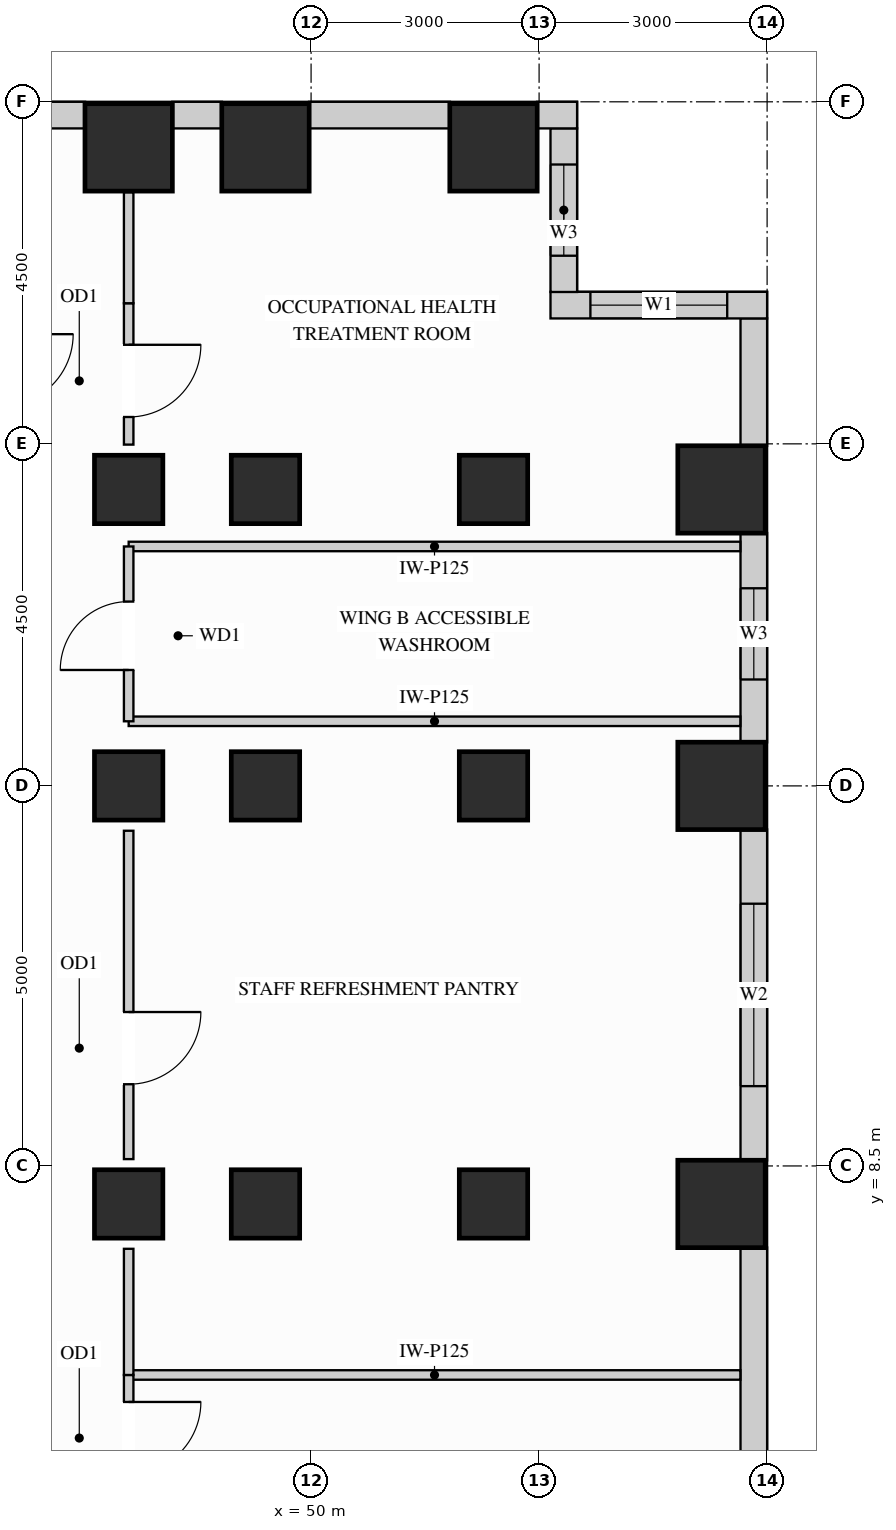
"""IFC4 building model, lengths in metres.
Left out: names, types, materials, properties, quantities, classifications, styles, units other than length and angle.
Written with IfcOpenShell. Run it as: python <this file> out.ifc"""

import sys

from ifc_helpers import new_model, si_unit, direction, frame, frame_2d, origin, origin_2d, place, context, subcontext, project, spatial, rectangle, extrude, source, transform, mapped, element, fill, save


model = new_model("IFC4")
c1 = context("Model", 3, precision=1e-05, world=origin(), true_north=direction((0.0, 1.0)))
c2 = subcontext(c1, "Body", "Model", "MODEL_VIEW")
j1 = project(units=[si_unit("LENGTHUNIT", "METRE"), si_unit("PLANEANGLEUNIT", "RADIAN")], contexts=[c1])
p1 = place(None, origin())
s1 = spatial("IfcSite", under=j1, at=p1, CompositionType="ELEMENT")
p2 = place(p1, origin())
s2 = spatial("IfcBuilding", under=s1, at=p2, CompositionType="ELEMENT")
p3 = place(p2, frame((0.0, 0.0, 117.0)))
s3 = spatial("IfcBuildingStorey", under=s2, at=p3, CompositionType="ELEMENT", Elevation=117.0)
m1 = source(origin(), c2, "Body", "SweptSolid", [
    extrude(rectangle(XDim=0.9, YDim=0.9, at=origin_2d()), origin(), (0.0, 0.0, 1.0), 3.38),
])
for number, where, z_axis, x_axis in (
    (1, (47.6, 13.5, 0.0), (0.0, 0.0, 1.0), (1.0, 0.0, 0.0)),
    (2, (47.6, 8.0, 0.0), (0.0, 0.0, 1.0), (1.0, 0.0, 0.0)),
    (3, (47.6, 17.4, 0.0), (0.0, 0.0, 1.0), (1.0, 0.0, 0.0)),
    (4, (49.4, 13.5, 0.0), (0.0, 0.0, 1.0), (1.0, 0.0, 0.0)),
    (5, (49.4, 17.4, 0.0), (0.0, 0.0, 1.0), (1.0, 0.0, 0.0)),
    (6, (49.4, 8.0, 0.0), (0.0, 0.0, 1.0), (1.0, 0.0, 0.0)),
    (7, (52.4, 13.5, 0.0), (0.0, 0.0, 1.0), (1.0, 0.0, 0.0)),
    (8, (52.4, 17.4, 0.0), (0.0, 0.0, 1.0), (1.0, 0.0, 0.0)),
    (9, (52.4, 8.0, 0.0), (0.0, 0.0, 1.0), (1.0, 0.0, 0.0)),
):
    element("IfcColumn", number, at=place(p3, frame(where, z_axis=z_axis, x_axis=x_axis)), inside=s3, PredefinedType="COLUMN", context=c2, shape_type="MappedRepresentation", body=[
        mapped(m1, transform((0.0, 0.0, 0.0), x_axis=(1.0, 0.0, 0.0), y_axis=(0.0, 1.0, 0.0), z_axis=(0.0, 0.0, 1.0))),
    ])
m2 = source(origin(), c2, "Body", "SweptSolid", [
    extrude(rectangle(XDim=1.15, YDim=1.15, at=origin_2d()), origin(), (0.0, 0.0, 1.0), 3.38),
])
for number, where, z_axis, x_axis in (
    (10, (47.6, 21.9, 0.0), (0.0, 0.0, 1.0), (1.0, 0.0, 0.0)),
    (11, (49.4, 21.9, 0.0), (0.0, 0.0, 1.0), (1.0, 0.0, 0.0)),
    (12, (52.4, 21.9, 0.0), (0.0, 0.0, 1.0), (1.0, 0.0, 0.0)),
    (13, (55.4, 13.5, 0.0), (0.0, 0.0, 1.0), (1.0, 0.0, 0.0)),
    (14, (55.4, 17.4, 0.0), (0.0, 0.0, 1.0), (1.0, 0.0, 0.0)),
    (15, (55.4, 8.0, 0.0), (0.0, 0.0, 1.0), (1.0, 0.0, 0.0)),
):
    element("IfcColumn", number, at=place(p3, frame(where, z_axis=z_axis, x_axis=x_axis)), inside=s3, PredefinedType="COLUMN", context=c2, shape_type="MappedRepresentation", body=[
        mapped(m2, transform((0.0, 0.0, 0.0), x_axis=(1.0, 0.0, 0.0), y_axis=(0.0, 1.0, 0.0), z_axis=(0.0, 0.0, 1.0))),
    ])
m3 = source(origin(), c2, "Body", "SweptSolid", [
    extrude(rectangle(XDim=3.354, YDim=0.35, at=frame_2d((1.677, 0.0))), origin(), (0.0, 0.0, 1.0), 3.365),
])
p4 = place(p3, frame((55.825, 4.073, 0.0), z_axis=(0.0, 0.0, 1.0), x_axis=(0.0, 1.0, 0.0)))
e16 = element("IfcWall", 16, at=p4, inside=s3, PredefinedType="SOLIDWALL", context=c2, shape_type="MappedRepresentation", body=[
    mapped(m3, transform((0.0, 0.0, 0.0), x_axis=(1.0, 0.0, 0.0), y_axis=(0.0, 1.0, 0.0), z_axis=(0.0, 0.0, 1.0))),
])
p5 = place(p3, frame((55.825, 8.573, 0.0), z_axis=(0.0, 0.0, 1.0), x_axis=(0.0, 1.0, 0.0)))
e17 = element("IfcWall", 17, at=p5, inside=s3, PredefinedType="SOLIDWALL", context=c2, shape_type="SweptSolid", body=[
    extrude(rectangle(XDim=4.354, YDim=0.35, at=frame_2d((2.177, 0.0))), origin(), (0.0, 0.0, 1.0), 3.365),
])
p6 = place(p5, frame((0.977, 0.0, 0.78)))
e18 = element("IfcOpeningElement", 18, at=p6, cuts=e17, PredefinedType="OPENING", context=c2, shape_type="SweptSolid", body=[
    extrude(rectangle(XDim=2.4, YDim=2.1, at=frame_2d((1.2, 1.05))), frame((0.0, 0.185, 0.0), z_axis=(0.0, -1.0, 0.0), x_axis=(1.0, 0.0, 0.0)), (0.0, 0.0, 1.0), 0.37),
])
p7 = place(p3, frame((55.825, 14.073, 0.0), z_axis=(0.0, 0.0, 1.0), x_axis=(0.0, 1.0, 0.0)))
e19 = element("IfcWall", 19, at=p7, inside=s3, PredefinedType="SOLIDWALL", context=c2, shape_type="SweptSolid", body=[
    extrude(rectangle(XDim=2.754, YDim=0.35, at=frame_2d((1.377, 0.0))), origin(), (0.0, 0.0, 1.0), 3.365),
])
p8 = place(p7, frame((0.827, 0.0, 0.78)))
e20 = element("IfcOpeningElement", 20, at=p8, cuts=e19, PredefinedType="OPENING", context=c2, shape_type="SweptSolid", body=[
    extrude(rectangle(XDim=1.2, YDim=2.1, at=frame_2d((0.6, 1.05))), frame((0.0, 0.185, 0.0), z_axis=(0.0, -1.0, 0.0), x_axis=(1.0, 0.0, 0.0)), (0.0, 0.0, 1.0), 0.37),
])
m4 = source(origin(), c2, "Body", "SweptSolid", [
    extrude(rectangle(XDim=1.679, YDim=0.35, at=frame_2d((0.84, 0.0))), origin(), (0.0, 0.0, 1.0), 3.365),
])
p9 = place(p3, frame((55.825, 17.973, 0.0), z_axis=(0.0, 0.0, 1.0), x_axis=(0.0, 1.0, 0.0)))
e21 = element("IfcWall", 21, at=p9, inside=s3, PredefinedType="SOLIDWALL", context=c2, shape_type="MappedRepresentation", body=[
    mapped(m4, transform((0.0, 0.0, 0.0), x_axis=(1.0, 0.0, 0.0), y_axis=(0.0, 1.0, 0.0), z_axis=(0.0, 0.0, 1.0))),
])
p10 = place(p3, frame((56.0, 19.825, 0.0), z_axis=(0.0, 0.0, 1.0), x_axis=(-1.0, 0.0, 0.0)))
e22 = element("IfcWall", 22, at=p10, inside=s3, PredefinedType="SOLIDWALL", context=c2, shape_type="SweptSolid", body=[
    extrude(rectangle(XDim=2.85, YDim=0.35, at=frame_2d((1.425, 0.0))), origin(), (0.0, 0.0, 1.0), 3.365),
])
p11 = place(p10, frame((0.525, 0.0, 0.78)))
e23 = element("IfcOpeningElement", 23, at=p11, cuts=e22, PredefinedType="OPENING", context=c2, shape_type="SweptSolid", body=[
    extrude(rectangle(XDim=1.8, YDim=2.1, at=frame_2d((0.9, 1.05))), frame((0.0, 0.185, 0.0), z_axis=(0.0, -1.0, 0.0), x_axis=(1.0, 0.0, 0.0)), (0.0, 0.0, 1.0), 0.37),
])
p12 = place(p3, frame((53.325, 19.998, 0.0), z_axis=(0.0, 0.0, 1.0), x_axis=(0.0, 1.0, 0.0)))
e24 = element("IfcWall", 24, at=p12, inside=s3, PredefinedType="SOLIDWALL", context=c2, shape_type="SweptSolid", body=[
    extrude(rectangle(XDim=2.154, YDim=0.35, at=frame_2d((1.077, 0.0))), origin(), (0.0, 0.0, 1.0), 3.365),
])
p13 = place(p12, frame((0.477, 0.0, 0.78)))
e25 = element("IfcOpeningElement", 25, at=p13, cuts=e24, PredefinedType="OPENING", context=c2, shape_type="SweptSolid", body=[
    extrude(rectangle(XDim=1.2, YDim=2.1, at=frame_2d((0.6, 1.05))), frame((0.0, 0.185, 0.0), z_axis=(0.0, -1.0, 0.0), x_axis=(1.0, 0.0, 0.0)), (0.0, 0.0, 1.0), 0.37),
])
m5 = source(origin(), c2, "Body", "SweptSolid", [
    extrude(rectangle(XDim=0.527, YDim=0.35, at=frame_2d((0.264, 0.0))), origin(), (0.0, 0.0, 1.0), 3.365),
])
p14 = place(p3, frame((53.5, 22.325, 0.0), z_axis=(0.0, 0.0, 1.0), x_axis=(-1.0, 0.0, 0.0)))
e26 = element("IfcWall", 26, at=p14, inside=s3, PredefinedType="SOLIDWALL", context=c2, shape_type="MappedRepresentation", body=[
    mapped(m5, transform((0.0, 0.0, 0.0), x_axis=(1.0, 0.0, 0.0), y_axis=(0.0, 1.0, 0.0), z_axis=(0.0, 0.0, 1.0))),
])
m6 = source(origin(), c2, "Body", "SweptSolid", [
    extrude(rectangle(XDim=1.854, YDim=0.35, at=frame_2d((0.927, 0.0))), origin(), (0.0, 0.0, 1.0), 3.365),
])
p15 = place(p3, frame((51.827, 22.325, 0.0), z_axis=(0.0, 0.0, 1.0), x_axis=(-1.0, 0.0, 0.0)))
e27 = element("IfcWall", 27, at=p15, inside=s3, PredefinedType="SOLIDWALL", context=c2, shape_type="MappedRepresentation", body=[
    mapped(m6, transform((0.0, 0.0, 0.0), x_axis=(1.0, 0.0, 0.0), y_axis=(0.0, 1.0, 0.0), z_axis=(0.0, 0.0, 1.0))),
])
m7 = source(origin(), c2, "Body", "SweptSolid", [
    extrude(rectangle(XDim=0.654, YDim=0.35, at=frame_2d((0.327, 0.0))), origin(), (0.0, 0.0, 1.0), 3.365),
])
p16 = place(p3, frame((48.827, 22.325, 0.0), z_axis=(0.0, 0.0, 1.0), x_axis=(-1.0, 0.0, 0.0)))
e28 = element("IfcWall", 28, at=p16, inside=s3, PredefinedType="SOLIDWALL", context=c2, shape_type="MappedRepresentation", body=[
    mapped(m7, transform((0.0, 0.0, 0.0), x_axis=(1.0, 0.0, 0.0), y_axis=(0.0, 1.0, 0.0), z_axis=(0.0, 0.0, 1.0))),
])
p17 = place(p3, frame((47.027, 22.325, 0.0), z_axis=(0.0, 0.0, 1.0), x_axis=(-1.0, 0.0, 0.0)))
e29 = element("IfcWall", 29, at=p17, inside=s3, PredefinedType="SOLIDWALL", context=c2, shape_type="SweptSolid", body=[
    extrude(rectangle(XDim=6.454, YDim=0.35, at=frame_2d((3.227, 0.0))), origin(), (0.0, 0.0, 1.0), 3.365),
])
p18 = place(p17, frame((1.749, 0.0, 0.78)))
e30 = element("IfcOpeningElement", 30, at=p18, cuts=e29, PredefinedType="OPENING", context=c2, shape_type="SweptSolid", body=[
    extrude(rectangle(XDim=1.8, YDim=2.1, at=frame_2d((0.9, 1.05))), frame((0.0, 0.185, 0.0), z_axis=(0.0, -1.0, 0.0), x_axis=(1.0, 0.0, 0.0)), (0.0, 0.0, 1.0), 0.37),
])
p19 = place(p17, frame((3.942, 0.0, 0.78)))
e31 = element("IfcOpeningElement", 31, at=p19, cuts=e29, PredefinedType="OPENING", context=c2, shape_type="SweptSolid", body=[
    extrude(rectangle(XDim=1.8, YDim=2.1, at=frame_2d((0.9, 1.05))), frame((0.0, 0.185, 0.0), z_axis=(0.0, -1.0, 0.0), x_axis=(1.0, 0.0, 0.0)), (0.0, 0.0, 1.0), 0.37),
])
m8 = source(origin(), c2, "Body", "SweptSolid", [
    extrude(rectangle(XDim=8.048, YDim=0.125, at=frame_2d((4.024, 0.0))), origin(), (0.0, 0.0, 1.0), 3.365),
])
p20 = place(p3, frame((47.6, 14.35, 0.0), z_axis=(0.0, 0.0, 1.0), x_axis=(1.0, 0.0, 0.0)))
e32 = element("IfcWall", 32, at=p20, inside=s3, PredefinedType="PARTITIONING", context=c2, shape_type="MappedRepresentation", body=[
    mapped(m8, transform((0.0, 0.0, 0.0), x_axis=(1.0, 0.0, 0.0), y_axis=(0.0, 1.0, 0.0), z_axis=(0.0, 0.0, 1.0))),
])
m9 = source(origin(), c2, "Body", "SweptSolid", [
    extrude(rectangle(XDim=8.048, YDim=0.125, at=frame_2d((4.024, 0.0))), origin(), (0.0, 0.0, 1.0), 2.677),
])
p21 = place(p3, frame((47.6, 16.65, 0.0), z_axis=(0.0, 0.0, 1.0), x_axis=(1.0, 0.0, 0.0)))
e33 = element("IfcWall", 33, at=p21, inside=s3, PredefinedType="PARTITIONING", context=c2, shape_type="MappedRepresentation", body=[
    mapped(m9, transform((0.0, 0.0, 0.0), x_axis=(1.0, 0.0, 0.0), y_axis=(0.0, 1.0, 0.0), z_axis=(0.0, 0.0, 1.0))),
])
p22 = place(p3, frame((47.6, 5.75, 0.0), z_axis=(0.0, 0.0, 1.0), x_axis=(1.0, 0.0, 0.0)))
e34 = element("IfcWall", 34, at=p22, inside=s3, PredefinedType="PARTITIONING", context=c2, shape_type="MappedRepresentation", body=[
    mapped(m8, transform((0.0, 0.0, 0.0), x_axis=(1.0, 0.0, 0.0), y_axis=(0.0, 1.0, 0.0), z_axis=(0.0, 0.0, 1.0))),
])
p23 = place(p3, frame((47.6, 4.09, 0.0), z_axis=(0.0, 0.0, 1.0), x_axis=(0.0, 1.0, 0.0)))
e35 = element("IfcWall", 35, at=p23, inside=s3, PredefinedType="PARTITIONING", context=c2, shape_type="SweptSolid", body=[
    extrude(rectangle(XDim=1.66, YDim=0.125, at=frame_2d((0.83, 0.0))), origin(), (0.0, 0.0, 1.0), 2.677),
])
p24 = place(p23, frame((0.355, 0.0, 0.0)))
e36 = element("IfcOpeningElement", 36, at=p24, cuts=e35, PredefinedType="OPENING", context=c2, shape_type="SweptSolid", body=[
    extrude(rectangle(XDim=0.95, YDim=2.15, at=frame_2d((0.475, 1.075))), frame((0.0, 0.073, 0.0), z_axis=(0.0, -1.0, 0.0), x_axis=(1.0, 0.0, 0.0)), (0.0, 0.0, 1.0), 0.145),
])
m10 = source(origin(), c2, "Body", "SweptSolid", [
    extrude(rectangle(XDim=1.66, YDim=0.125, at=frame_2d((0.83, 0.0))), origin(), (0.0, 0.0, 1.0), 2.677),
])
p25 = place(p3, frame((47.6, 5.75, 0.0), z_axis=(0.0, 0.0, 1.0), x_axis=(0.0, 1.0, 0.0)))
e37 = element("IfcWall", 37, at=p25, inside=s3, PredefinedType="PARTITIONING", context=c2, shape_type="MappedRepresentation", body=[
    mapped(m10, transform((0.0, 0.0, 0.0), x_axis=(1.0, 0.0, 0.0), y_axis=(0.0, 1.0, 0.0), z_axis=(0.0, 0.0, 1.0))),
])
p26 = place(p3, frame((47.6, 8.59, 0.0), z_axis=(0.0, 0.0, 1.0), x_axis=(0.0, 1.0, 0.0)))
e38 = element("IfcWall", 38, at=p26, inside=s3, PredefinedType="PARTITIONING", context=c2, shape_type="SweptSolid", body=[
    extrude(rectangle(XDim=4.32, YDim=0.125, at=frame_2d((2.16, 0.0))), origin(), (0.0, 0.0, 1.0), 2.677),
])
p27 = place(p26, frame((0.985, 0.0, 0.0)))
e39 = element("IfcOpeningElement", 39, at=p27, cuts=e38, PredefinedType="OPENING", context=c2, shape_type="SweptSolid", body=[
    extrude(rectangle(XDim=0.95, YDim=2.15, at=frame_2d((0.475, 1.075))), frame((0.0, 0.073, 0.0), z_axis=(0.0, -1.0, 0.0), x_axis=(1.0, 0.0, 0.0)), (0.0, 0.0, 1.0), 0.145),
])
p28 = place(p3, frame((47.6, 17.99, 0.0), z_axis=(0.0, 0.0, 1.0), x_axis=(0.0, 1.0, 0.0)))
e40 = element("IfcWall", 40, at=p28, inside=s3, PredefinedType="PARTITIONING", context=c2, shape_type="SweptSolid", body=[
    extrude(rectangle(XDim=1.86, YDim=0.125, at=frame_2d((0.93, 0.0))), origin(), (0.0, 0.0, 1.0), 2.677),
])
p29 = place(p28, frame((0.363, 0.0, 0.0)))
e41 = element("IfcOpeningElement", 41, at=p29, cuts=e40, PredefinedType="OPENING", context=c2, shape_type="SweptSolid", body=[
    extrude(rectangle(XDim=0.95, YDim=2.15, at=frame_2d((0.475, 1.075))), frame((0.0, 0.073, 0.0), z_axis=(0.0, -1.0, 0.0), x_axis=(1.0, 0.0, 0.0)), (0.0, 0.0, 1.0), 0.145),
])
m11 = source(origin(), c2, "Body", "SweptSolid", [
    extrude(rectangle(XDim=1.46, YDim=0.125, at=frame_2d((0.73, 0.0))), origin(), (0.0, 0.0, 1.0), 2.677),
])
p30 = place(p3, frame((47.6, 19.85, 0.0), z_axis=(0.0, 0.0, 1.0), x_axis=(0.0, 1.0, 0.0)))
e42 = element("IfcWall", 42, at=p30, inside=s3, PredefinedType="PARTITIONING", context=c2, shape_type="MappedRepresentation", body=[
    mapped(m11, transform((0.0, 0.0, 0.0), x_axis=(1.0, 0.0, 0.0), y_axis=(0.0, 1.0, 0.0), z_axis=(0.0, 0.0, 1.0))),
])
p31 = place(p3, frame((47.6, 14.35, 0.0), z_axis=(0.0, 0.0, 1.0), x_axis=(0.0, 1.0, 0.0)))
e43 = element("IfcWall", 43, at=p31, inside=s3, PredefinedType="PARTITIONING", context=c2, shape_type="SweptSolid", body=[
    extrude(rectangle(XDim=2.3, YDim=0.125, at=frame_2d((1.15, 0.0))), origin(), (0.0, 0.0, 1.0), 2.677),
])
p32 = place(p31, frame((0.675, 0.0, 0.0)))
e44 = element("IfcOpeningElement", 44, at=p32, cuts=e43, PredefinedType="OPENING", context=c2, shape_type="SweptSolid", body=[
    extrude(rectangle(XDim=0.9, YDim=2.15, at=frame_2d((0.45, 1.075))), frame((0.0, 0.073, 0.0), z_axis=(0.0, -1.0, 0.0), x_axis=(1.0, 0.0, 0.0)), (0.0, 0.0, 1.0), 0.145),
])
m12 = source(origin(), c2, "Body", "SweptSolid", [
    extrude(rectangle(XDim=0.95, YDim=2.15, at=frame_2d((0.475, 1.075))), frame((0.0, 0.025, 0.0), z_axis=(0.0, -1.0, 0.0), x_axis=(1.0, 0.0, 0.0)), (0.0, 0.0, 1.0), 0.05),
])
p33 = place(p24, origin())
e45 = element("IfcDoor", 45, at=p33, inside=s3, OperationType="SINGLE_SWING_RIGHT", PredefinedType="DOOR", context=c2, shape_type="MappedRepresentation", body=[
    mapped(m12, transform((0.0, 0.0, 0.0), x_axis=(1.0, 0.0, 0.0), y_axis=(0.0, 1.0, 0.0), z_axis=(0.0, 0.0, 1.0))),
])
fill(e36, e45)
p34 = place(p27, origin())
e46 = element("IfcDoor", 46, at=p34, inside=s3, OperationType="SINGLE_SWING_RIGHT", PredefinedType="DOOR", context=c2, shape_type="MappedRepresentation", body=[
    mapped(m12, transform((0.0, 0.0, 0.0), x_axis=(1.0, 0.0, 0.0), y_axis=(0.0, 1.0, 0.0), z_axis=(0.0, 0.0, 1.0))),
])
fill(e39, e46)
p35 = place(p29, origin())
e47 = element("IfcDoor", 47, at=p35, inside=s3, OperationType="SINGLE_SWING_RIGHT", PredefinedType="DOOR", context=c2, shape_type="MappedRepresentation", body=[
    mapped(m12, transform((0.0, 0.0, 0.0), x_axis=(1.0, 0.0, 0.0), y_axis=(0.0, 1.0, 0.0), z_axis=(0.0, 0.0, 1.0))),
])
fill(e41, e47)
m13 = source(origin(), c2, "Body", "SweptSolid", [
    extrude(rectangle(XDim=0.9, YDim=2.15, at=frame_2d((0.45, 1.075))), frame((0.0, 0.025, 0.0), z_axis=(0.0, -1.0, 0.0), x_axis=(1.0, 0.0, 0.0)), (0.0, 0.0, 1.0), 0.05),
])
p36 = place(p32, origin())
e48 = element("IfcDoor", 48, at=p36, inside=s3, OperationType="SINGLE_SWING_LEFT", PredefinedType="DOOR", context=c2, shape_type="MappedRepresentation", body=[
    mapped(m13, transform((0.0, 0.0, 0.0), x_axis=(1.0, 0.0, 0.0), y_axis=(0.0, 1.0, 0.0), z_axis=(0.0, 0.0, 1.0))),
])
fill(e44, e48)
m14 = source(origin(), c2, "Body", "SweptSolid", [
    extrude(rectangle(XDim=1.8, YDim=2.1, at=frame_2d((0.9, 1.05))), frame((0.0, 0.03, 0.0), z_axis=(0.0, -1.0, 0.0), x_axis=(1.0, 0.0, 0.0)), (0.0, 0.0, 1.0), 0.06),
])
p37 = place(p11, origin())
e49 = element("IfcWindow", 49, at=p37, inside=s3, PartitioningType="SINGLE_PANEL", PredefinedType="WINDOW", context=c2, shape_type="MappedRepresentation", body=[
    mapped(m14, transform((0.0, 0.0, 0.0), x_axis=(1.0, 0.0, 0.0), y_axis=(0.0, 1.0, 0.0), z_axis=(0.0, 0.0, 1.0))),
])
fill(e23, e49)
m15 = source(origin(), c2, "Body", "SweptSolid", [
    extrude(rectangle(XDim=2.4, YDim=2.1, at=frame_2d((1.2, 1.05))), frame((0.0, 0.03, 0.0), z_axis=(0.0, -1.0, 0.0), x_axis=(1.0, 0.0, 0.0)), (0.0, 0.0, 1.0), 0.06),
])
p38 = place(p6, origin())
e50 = element("IfcWindow", 50, at=p38, inside=s3, PartitioningType="SINGLE_PANEL", PredefinedType="WINDOW", context=c2, shape_type="MappedRepresentation", body=[
    mapped(m15, transform((0.0, 0.0, 0.0), x_axis=(1.0, 0.0, 0.0), y_axis=(0.0, 1.0, 0.0), z_axis=(0.0, 0.0, 1.0))),
])
fill(e18, e50)
m16 = source(origin(), c2, "Body", "SweptSolid", [
    extrude(rectangle(XDim=1.2, YDim=2.1, at=frame_2d((0.6, 1.05))), frame((0.0, 0.03, 0.0), z_axis=(0.0, -1.0, 0.0), x_axis=(1.0, 0.0, 0.0)), (0.0, 0.0, 1.0), 0.06),
])
p39 = place(p8, origin())
e51 = element("IfcWindow", 51, at=p39, inside=s3, PartitioningType="SINGLE_PANEL", PredefinedType="WINDOW", context=c2, shape_type="MappedRepresentation", body=[
    mapped(m16, transform((0.0, 0.0, 0.0), x_axis=(1.0, 0.0, 0.0), y_axis=(0.0, 1.0, 0.0), z_axis=(0.0, 0.0, 1.0))),
])
fill(e20, e51)
p40 = place(p13, origin())
e52 = element("IfcWindow", 52, at=p40, inside=s3, PartitioningType="SINGLE_PANEL", PredefinedType="WINDOW", context=c2, shape_type="MappedRepresentation", body=[
    mapped(m16, transform((0.0, 0.0, 0.0), x_axis=(1.0, 0.0, 0.0), y_axis=(0.0, 1.0, 0.0), z_axis=(0.0, 0.0, 1.0))),
])
fill(e25, e52)
save(model, sys.argv[1])
